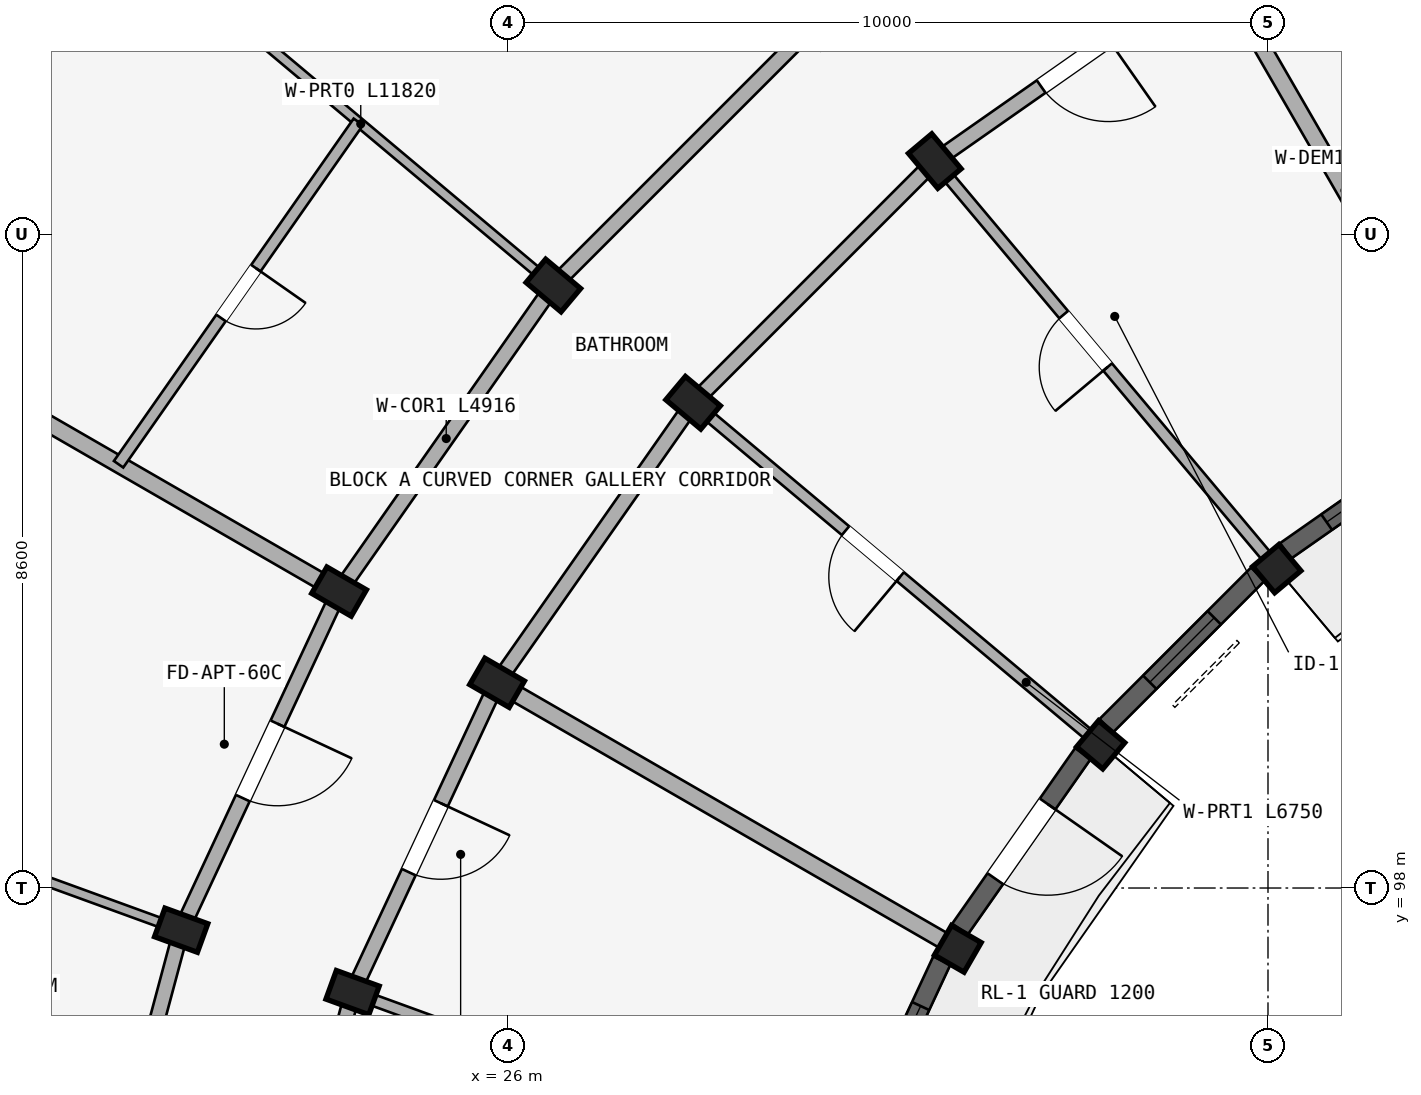
"""IFC4 building model, lengths in metres.
Left out: names, types, materials, properties, quantities, classifications, styles, units other than length and angle.
Written with IfcOpenShell. Run it as: python <this file> out.ifc"""

import sys

from ifc_helpers import new_model, si_unit, direction, frame, frame_2d, origin, origin_2d, place, context, subcontext, project, spatial, rectangle, extrude, element, fill, save


model = new_model("IFC4")
c1 = context("Model", 3, precision=1e-05, world=origin(), true_north=direction((0.0, 1.0)))
c2 = subcontext(c1, "Body", "Model", "MODEL_VIEW")
j1 = project(units=[si_unit("LENGTHUNIT", "METRE"), si_unit("PLANEANGLEUNIT", "RADIAN")], contexts=[c1])
p1 = place(None, origin())
s1 = spatial("IfcSite", under=j1, at=p1, CompositionType="ELEMENT")
p2 = place(p1, origin())
s2 = spatial("IfcBuilding", under=s1, at=p2, CompositionType="ELEMENT")
p3 = place(p2, frame((0.0, 0.0, 43.35)))
s3 = spatial("IfcBuildingStorey", under=s2, at=p3, CompositionType="ELEMENT", Elevation=43.35)
p4 = place(p3, frame((36.115, 102.202, 0.0), z_axis=(0.0, 0.0, 1.0), x_axis=(0.766044443119, 0.642787609687, 0.0)))
e1 = element("IfcColumn", 1, at=p4, inside=s3, PredefinedType="COLUMN", context=c2, shape_type="SweptSolid", body=[
    extrude(rectangle(XDim=0.45, YDim=0.45, at=origin_2d()), origin(), (0.0, 0.0, 1.0), 2.93),
])
p5 = place(p3, frame((31.616, 107.564, 0.0), z_axis=(0.0, 0.0, 1.0), x_axis=(0.766044443119, 0.642787609687, 0.0)))
e2 = element("IfcColumn", 2, at=p5, inside=s3, PredefinedType="COLUMN", context=c2, shape_type="SweptSolid", body=[
    extrude(rectangle(XDim=0.4, YDim=0.6, at=origin_2d()), origin(), (0.0, 0.0, 1.0), 2.93),
])
p6 = place(p3, frame((33.798, 99.885, 0.0), z_axis=(0.0, 0.0, 1.0), x_axis=(0.642787609687, 0.766044443119, 0.0)))
e3 = element("IfcColumn", 3, at=p6, inside=s3, PredefinedType="COLUMN", context=c2, shape_type="SweptSolid", body=[
    extrude(rectangle(XDim=0.45, YDim=0.45, at=origin_2d()), origin(), (0.0, 0.0, 1.0), 2.93),
])
for number, where, z_axis, x_axis in (
    (4, (28.436, 104.384, 0.0), (0.0, 0.0, 1.0), (0.643, 0.766, 0.0)),
    (5, (26.598, 105.927, 0.0), (0.0, 0.0, 1.0), (0.643, 0.766, 0.0)),
):
    element("IfcColumn", number, at=place(p3, frame(where, z_axis=z_axis, x_axis=x_axis)), inside=s3, PredefinedType="COLUMN", context=c2, shape_type="SweptSolid", body=[
        extrude(rectangle(XDim=0.4, YDim=0.6, at=origin_2d()), origin(), (0.0, 0.0, 1.0), 2.93),
    ])
p7 = place(p3, frame((31.919, 97.2, 0.0), z_axis=(0.0, 0.0, 1.0), x_axis=(0.5, 0.866025403784, 0.0)))
e6 = element("IfcColumn", 6, at=p7, inside=s3, PredefinedType="COLUMN", context=c2, shape_type="SweptSolid", body=[
    extrude(rectangle(XDim=0.45, YDim=0.45, at=origin_2d()), origin(), (0.0, 0.0, 1.0), 2.93),
])
for number, where, z_axis, x_axis in (
    (7, (25.856, 100.7, 0.0), (0.0, 0.0, 1.0), (0.5, 0.866, 0.0)),
    (8, (23.778, 101.9, 0.0), (0.0, 0.0, 1.0), (0.5, 0.866, 0.0)),
    (9, (23.956, 96.624, 0.0), (0.0, 0.0, 1.0), (0.342, 0.94, 0.0)),
    (10, (21.701, 97.445, 0.0), (0.0, 0.0, 1.0), (0.342, 0.94, 0.0)),
):
    element("IfcColumn", number, at=place(p3, frame(where, z_axis=z_axis, x_axis=x_axis)), inside=s3, PredefinedType="COLUMN", context=c2, shape_type="SweptSolid", body=[
        extrude(rectangle(XDim=0.4, YDim=0.6, at=origin_2d()), origin(), (0.0, 0.0, 1.0), 2.93),
    ])
p8 = place(p3, frame((35.3, 110.144, 0.0), z_axis=(0.0, 0.0, 1.0), x_axis=(-0.819155404658, -0.573571637217, 0.0)))
e11 = element("IfcWall", 11, at=p8, inside=s3, PredefinedType="STANDARD", context=c2, shape_type="SweptSolid", body=[
    extrude(rectangle(XDim=4.497, YDim=0.2, at=frame_2d((2.249, 0.0))), origin(), (0.0, 0.0, 1.0), 2.372),
])
p9 = place(p8, frame((1.709, 0.0, 0.0)))
e12 = element("IfcOpeningElement", 12, at=p9, cuts=e11, PredefinedType="OPENING", context=c2, shape_type="SweptSolid", body=[
    extrude(rectangle(XDim=1.08, YDim=2.15, at=frame_2d((0.54, 1.075))), frame((0.0, 0.11, 0.0), z_axis=(0.0, -1.0, 0.0), x_axis=(1.0, 0.0, 0.0)), (0.0, 0.0, 1.0), 0.22),
])
p10 = place(p3, frame((31.616, 107.564, 0.0), z_axis=(0.0, 0.0, 1.0), x_axis=(-0.707106781187, -0.707106781187, 0.0)))
e13 = element("IfcWall", 13, at=p10, inside=s3, PredefinedType="STANDARD", context=c2, shape_type="SweptSolid", body=[
    extrude(rectangle(XDim=4.497, YDim=0.2, at=frame_2d((2.249, 0.0))), origin(), (0.0, 0.0, 1.0), 2.372),
])
p11 = place(p3, frame((30.073, 109.402, 0.0), z_axis=(0.0, 0.0, 1.0), x_axis=(-0.707106781187, -0.707106781187, 0.0)))
e14 = element("IfcWall", 14, at=p11, inside=s3, PredefinedType="STANDARD", context=c2, shape_type="SweptSolid", body=[
    extrude(rectangle(XDim=4.916, YDim=0.2, at=frame_2d((2.458, 0.0))), origin(), (0.0, 0.0, 1.0), 2.372),
])
p12 = place(p3, frame((28.436, 104.384, 0.0), z_axis=(0.0, 0.0, 1.0), x_axis=(-0.573571637217, -0.819155404658, 0.0)))
e15 = element("IfcWall", 15, at=p12, inside=s3, PredefinedType="STANDARD", context=c2, shape_type="SweptSolid", body=[
    extrude(rectangle(XDim=4.497, YDim=0.2, at=frame_2d((2.249, 0.0))), origin(), (0.0, 0.0, 1.0), 2.372),
])
p13 = place(p3, frame((26.598, 105.927, 0.0), z_axis=(0.0, 0.0, 1.0), x_axis=(-0.573592335331, -0.819140911474, 0.0)))
e16 = element("IfcWall", 16, at=p13, inside=s3, PredefinedType="STANDARD", context=c2, shape_type="SweptSolid", body=[
    extrude(rectangle(XDim=4.916, YDim=0.2, at=frame_2d((2.458, 0.0))), origin(), (0.0, 0.0, 1.0), 2.372),
])
p14 = place(p3, frame((25.856, 100.7, 0.0), z_axis=(0.0, 0.0, 1.0), x_axis=(-0.422617978463, -0.906307919131, 0.0)))
e17 = element("IfcWall", 17, at=p14, inside=s3, PredefinedType="STANDARD", context=c2, shape_type="SweptSolid", body=[
    extrude(rectangle(XDim=4.497, YDim=0.2, at=frame_2d((2.249, 0.0))), origin(), (0.0, 0.0, 1.0), 2.372),
])
p15 = place(p14, frame((1.749, 0.0, 0.0)))
e18 = element("IfcOpeningElement", 18, at=p15, cuts=e17, PredefinedType="OPENING", context=c2, shape_type="SweptSolid", body=[
    extrude(rectangle(XDim=1.0, YDim=2.15, at=frame_2d((0.5, 1.075))), frame((0.0, 0.11, 0.0), z_axis=(0.0, -1.0, 0.0), x_axis=(1.0, 0.0, 0.0)), (0.0, 0.0, 1.0), 0.22),
])
p16 = place(p3, frame((23.778, 101.9, 0.0), z_axis=(0.0, 0.0, 1.0), x_axis=(-0.422629854778, -0.906302381024, 0.0)))
e19 = element("IfcWall", 19, at=p16, inside=s3, PredefinedType="STANDARD", context=c2, shape_type="SweptSolid", body=[
    extrude(rectangle(XDim=4.915, YDim=0.2, at=frame_2d((2.458, 0.0))), origin(), (0.0, 0.0, 1.0), 2.372),
])
p17 = place(p16, frame((1.918, 0.0, 0.0)))
e20 = element("IfcOpeningElement", 20, at=p17, cuts=e19, PredefinedType="OPENING", context=c2, shape_type="SweptSolid", body=[
    extrude(rectangle(XDim=1.08, YDim=2.15, at=frame_2d((0.54, 1.075))), frame((0.0, 0.11, 0.0), z_axis=(0.0, -1.0, 0.0), x_axis=(1.0, 0.0, 0.0)), (0.0, 0.0, 1.0), 0.22),
])
p18 = place(p3, frame((23.956, 96.624, 0.0), z_axis=(0.0, 0.0, 1.0), x_axis=(-0.258787642463, -0.965934240054, 0.0)))
e21 = element("IfcWall", 21, at=p18, inside=s3, PredefinedType="STANDARD", context=c2, shape_type="SweptSolid", body=[
    extrude(rectangle(XDim=4.497, YDim=0.2, at=frame_2d((2.249, 0.0))), origin(), (0.0, 0.0, 1.0), 2.372),
])
p19 = place(p3, frame((21.701, 97.445, 0.0), z_axis=(0.0, 0.0, 1.0), x_axis=(-0.258803112091, -0.965930095386, 0.0)))
e22 = element("IfcWall", 22, at=p19, inside=s3, PredefinedType="STANDARD", context=c2, shape_type="SweptSolid", body=[
    extrude(rectangle(XDim=4.916, YDim=0.2, at=frame_2d((2.458, 0.0))), origin(), (0.0, 0.0, 1.0), 2.372),
])
p20 = place(p3, frame((38.7, 104.254, 0.0), z_axis=(0.0, 0.0, 1.0), x_axis=(-0.499997969693, 0.866026575979, 0.0)))
e23 = element("IfcWall", 23, at=p20, inside=s3, PredefinedType="STANDARD", context=c2, shape_type="SweptSolid", body=[
    extrude(rectangle(XDim=6.75, YDim=0.22, at=frame_2d((3.375, 0.0))), origin(), (0.0, 0.0, 1.0), 2.372),
])
p21 = place(p3, frame((35.987, 102.355, 0.0), z_axis=(0.0, 0.0, 1.0), x_axis=(-0.642784846501, 0.766046761698, 0.0)))
e24 = element("IfcWall", 24, at=p21, inside=s3, PredefinedType="PARTITIONING", context=c2, shape_type="SweptSolid", body=[
    extrude(rectangle(XDim=6.75, YDim=0.15, at=frame_2d((3.375, 0.0))), origin(), (0.0, 0.0, 1.0), 2.372),
])
p22 = place(p21, frame((3.262, 0.0, 0.0)))
e25 = element("IfcOpeningElement", 25, at=p22, cuts=e24, PredefinedType="OPENING", context=c2, shape_type="SweptSolid", body=[
    extrude(rectangle(XDim=0.9, YDim=2.1, at=frame_2d((0.45, 1.05))), frame((0.0, 0.085, 0.0), z_axis=(0.0, -1.0, 0.0), x_axis=(1.0, 0.0, 0.0)), (0.0, 0.0, 1.0), 0.17),
])
p23 = place(p3, frame((33.645, 100.013, 0.0), z_axis=(0.0, 0.0, 1.0), x_axis=(-0.766046761698, 0.642784846501, 0.0)))
e26 = element("IfcWall", 26, at=p23, inside=s3, PredefinedType="PARTITIONING", context=c2, shape_type="SweptSolid", body=[
    extrude(rectangle(XDim=6.75, YDim=0.15, at=frame_2d((3.375, 0.0))), origin(), (0.0, 0.0, 1.0), 2.372),
])
p24 = place(p23, frame((3.242, 0.0, 0.0)))
e27 = element("IfcOpeningElement", 27, at=p24, cuts=e26, PredefinedType="OPENING", context=c2, shape_type="SweptSolid", body=[
    extrude(rectangle(XDim=0.94, YDim=2.1, at=frame_2d((0.47, 1.05))), frame((0.0, 0.085, 0.0), z_axis=(0.0, -1.0, 0.0), x_axis=(1.0, 0.0, 0.0)), (0.0, 0.0, 1.0), 0.17),
])
p25 = place(p3, frame((26.521, 105.991, 0.0), z_axis=(0.0, 0.0, 1.0), x_axis=(-0.766049804211, 0.642781220531, 0.0)))
e28 = element("IfcWall", 28, at=p25, inside=s3, PredefinedType="PARTITIONING", context=c2, shape_type="SweptSolid", body=[
    extrude(rectangle(XDim=11.82, YDim=0.125, at=frame_2d((5.91, 0.0))), origin(), (0.0, 0.0, 1.0), 2.372),
])
p26 = place(p25, frame((7.5, 0.0, 0.0)))
e29 = element("IfcOpeningElement", 29, at=p26, cuts=e28, PredefinedType="OPENING", context=c2, shape_type="SweptSolid", body=[
    extrude(rectangle(XDim=0.8, YDim=2.1, at=frame_2d((0.4, 1.05))), frame((0.0, 0.073, 0.0), z_axis=(0.0, -1.0, 0.0), x_axis=(1.0, 0.0, 0.0)), (0.0, 0.0, 1.0), 0.145),
])
p27 = place(p3, frame((31.746, 97.3, 0.0), z_axis=(0.0, 0.0, 1.0), x_axis=(-0.866026575979, 0.499997969693, 0.0)))
e30 = element("IfcWall", 30, at=p27, inside=s3, PredefinedType="STANDARD", context=c2, shape_type="SweptSolid", body=[
    extrude(rectangle(XDim=6.75, YDim=0.22, at=frame_2d((3.375, 0.0))), origin(), (0.0, 0.0, 1.0), 2.372),
])
p28 = place(p3, frame((23.691, 101.95, 0.0), z_axis=(0.0, 0.0, 1.0), x_axis=(-0.866017730655, 0.500013290014, 0.0)))
e31 = element("IfcWall", 31, at=p28, inside=s3, PredefinedType="STANDARD", context=c2, shape_type="SweptSolid", body=[
    extrude(rectangle(XDim=11.82, YDim=0.22, at=frame_2d((5.91, 0.0))), origin(), (0.0, 0.0, 1.0), 2.372),
])
p29 = place(p3, frame((30.346, 94.298, 0.0), z_axis=(0.0, 0.0, 1.0), x_axis=(-0.939696231917, 0.342010221662, 0.0)))
e32 = element("IfcWall", 32, at=p29, inside=s3, PredefinedType="PARTITIONING", context=c2, shape_type="SweptSolid", body=[
    extrude(rectangle(XDim=6.75, YDim=0.15, at=frame_2d((3.375, 0.0))), origin(), (0.0, 0.0, 1.0), 2.372),
])
p30 = place(p29, frame((3.262, 0.0, 0.0)))
e33 = element("IfcOpeningElement", 33, at=p30, cuts=e32, PredefinedType="OPENING", context=c2, shape_type="SweptSolid", body=[
    extrude(rectangle(XDim=0.9, YDim=2.1, at=frame_2d((0.45, 1.05))), frame((0.0, 0.085, 0.0), z_axis=(0.0, -1.0, 0.0), x_axis=(1.0, 0.0, 0.0)), (0.0, 0.0, 1.0), 0.17),
])
p31 = place(p3, frame((21.607, 97.479, 0.0), z_axis=(0.0, 0.0, 1.0), x_axis=(-0.939698102693, 0.342005081534, 0.0)))
e34 = element("IfcWall", 34, at=p31, inside=s3, PredefinedType="PARTITIONING", context=c2, shape_type="SweptSolid", body=[
    extrude(rectangle(XDim=11.82, YDim=0.125, at=frame_2d((5.91, 0.0))), origin(), (0.0, 0.0, 1.0), 2.372),
])
p32 = place(p31, frame((7.5, 0.0, 0.0)))
e35 = element("IfcOpeningElement", 35, at=p32, cuts=e34, PredefinedType="OPENING", context=c2, shape_type="SweptSolid", body=[
    extrude(rectangle(XDim=0.8, YDim=2.1, at=frame_2d((0.4, 1.05))), frame((0.0, 0.073, 0.0), z_axis=(0.0, -1.0, 0.0), x_axis=(1.0, 0.0, 0.0)), (0.0, 0.0, 1.0), 0.145),
])
p33 = place(p3, frame((24.031, 108.08, 0.0), z_axis=(0.0, 0.0, 1.0), x_axis=(-0.573569599955, -0.819156831143, 0.0)))
e36 = element("IfcWall", 36, at=p33, inside=s3, PredefinedType="PLUMBINGWALL", context=c2, shape_type="SweptSolid", body=[
    extrude(rectangle(XDim=5.5, YDim=0.15, at=frame_2d((2.75, 0.0))), origin(), (0.0, 0.0, 1.0), 2.372),
])
p34 = place(p33, frame((2.35, 0.0, 0.0)))
e37 = element("IfcOpeningElement", 37, at=p34, cuts=e36, PredefinedType="OPENING", context=c2, shape_type="SweptSolid", body=[
    extrude(rectangle(XDim=0.8, YDim=2.1, at=frame_2d((0.4, 1.05))), frame((0.0, 0.085, 0.0), z_axis=(0.0, -1.0, 0.0), x_axis=(1.0, 0.0, 0.0)), (0.0, 0.0, 1.0), 0.17),
])
p35 = place(p3, frame((38.541, 104.053, 0.0), z_axis=(0.0, 0.0, 1.0), x_axis=(-0.819154644592, -0.573572722716, 0.0)))
e38 = element("IfcWall", 38, at=p35, inside=s3, PredefinedType="STANDARD", context=c2, shape_type="SweptSolid", body=[
    extrude(rectangle(XDim=2.82, YDim=0.25, at=frame_2d((1.41, 0.0))), origin(), (0.0, 0.0, 1.0), 2.422),
])
p36 = place(p35, frame((0.66, 0.0, 0.572)))
e39 = element("IfcOpeningElement", 39, at=p36, cuts=e38, PredefinedType="OPENING", context=c2, shape_type="SweptSolid", body=[
    extrude(rectangle(XDim=1.5, YDim=1.65, at=frame_2d((0.75, 0.825))), frame((0.0, 0.135, 0.0), z_axis=(0.0, -1.0, 0.0), x_axis=(1.0, 0.0, 0.0)), (0.0, 0.0, 1.0), 0.27),
])
p37 = place(p3, frame((35.866, 102.128, 0.0), z_axis=(0.0, 0.0, 1.0), x_axis=(-0.707106781187, -0.707106781187, 0.0)))
e40 = element("IfcWall", 40, at=p37, inside=s3, PredefinedType="STANDARD", context=c2, shape_type="SweptSolid", body=[
    extrude(rectangle(XDim=2.82, YDim=0.25, at=frame_2d((1.41, 0.0))), origin(), (0.0, 0.0, 1.0), 2.422),
])
p38 = place(p37, frame((0.81, 0.0, 0.722)))
e41 = element("IfcOpeningElement", 41, at=p38, cuts=e40, PredefinedType="OPENING", context=c2, shape_type="SweptSolid", body=[
    extrude(rectangle(XDim=1.2, YDim=1.5, at=frame_2d((0.6, 0.75))), frame((0.0, 0.135, 0.0), z_axis=(0.0, -1.0, 0.0), x_axis=(1.0, 0.0, 0.0)), (0.0, 0.0, 1.0), 0.27),
])
p39 = place(p3, frame((33.565, 99.769, 0.0), z_axis=(0.0, 0.0, 1.0), x_axis=(-0.573572722716, -0.819154644592, 0.0)))
e42 = element("IfcWall", 42, at=p39, inside=s3, PredefinedType="STANDARD", context=c2, shape_type="SweptSolid", body=[
    extrude(rectangle(XDim=2.82, YDim=0.25, at=frame_2d((1.41, 0.0))), origin(), (0.0, 0.0, 1.0), 2.422),
])
p40 = place(p39, frame((0.81, 0.0, 0.0)))
e43 = element("IfcOpeningElement", 43, at=p40, cuts=e42, PredefinedType="OPENING", context=c2, shape_type="SweptSolid", body=[
    extrude(rectangle(XDim=1.2, YDim=2.15, at=frame_2d((0.6, 1.075))), frame((0.0, 0.135, 0.0), z_axis=(0.0, -1.0, 0.0), x_axis=(1.0, 0.0, 0.0)), (0.0, 0.0, 1.0), 0.27),
])
p41 = place(p3, frame((31.709, 97.046, 0.0), z_axis=(0.0, 0.0, 1.0), x_axis=(-0.422667431484, -0.906284857185, 0.0)))
e44 = element("IfcWall", 44, at=p41, inside=s3, PredefinedType="STANDARD", context=c2, shape_type="SweptSolid", body=[
    extrude(rectangle(XDim=2.82, YDim=0.25, at=frame_2d((1.41, 0.0))), origin(), (0.0, 0.0, 1.0), 2.422),
])
p42 = place(p41, frame((0.66, 0.0, 0.572)))
e45 = element("IfcOpeningElement", 45, at=p42, cuts=e44, PredefinedType="OPENING", context=c2, shape_type="SweptSolid", body=[
    extrude(rectangle(XDim=1.5, YDim=1.65, at=frame_2d((0.75, 0.825))), frame((0.0, 0.135, 0.0), z_axis=(0.0, -1.0, 0.0), x_axis=(1.0, 0.0, 0.0)), (0.0, 0.0, 1.0), 0.27),
])
p43 = place(p36, origin())
e46 = element("IfcWindow", 46, at=p43, inside=s3, PartitioningType="DOUBLE_PANEL_VERTICAL", PredefinedType="WINDOW", context=c2, shape_type="SweptSolid", body=[
    extrude(rectangle(XDim=1.5, YDim=1.65, at=frame_2d((0.75, 0.825))), frame((0.0, 0.03, 0.0), z_axis=(0.0, -1.0, 0.0), x_axis=(1.0, 0.0, 0.0)), (0.0, 0.0, 1.0), 0.06),
])
fill(e39, e46)
p44 = place(p38, origin())
e47 = element("IfcWindow", 47, at=p44, inside=s3, PartitioningType="SINGLE_PANEL", PredefinedType="WINDOW", context=c2, shape_type="SweptSolid", body=[
    extrude(rectangle(XDim=1.2, YDim=1.5, at=frame_2d((0.6, 0.75))), frame((0.0, 0.03, 0.0), z_axis=(0.0, -1.0, 0.0), x_axis=(1.0, 0.0, 0.0)), (0.0, 0.0, 1.0), 0.06),
])
fill(e41, e47)
p45 = place(p42, origin())
e48 = element("IfcWindow", 48, at=p45, inside=s3, PartitioningType="DOUBLE_PANEL_VERTICAL", PredefinedType="WINDOW", context=c2, shape_type="SweptSolid", body=[
    extrude(rectangle(XDim=1.5, YDim=1.65, at=frame_2d((0.75, 0.825))), frame((0.0, 0.03, 0.0), z_axis=(0.0, -1.0, 0.0), x_axis=(1.0, 0.0, 0.0)), (0.0, 0.0, 1.0), 0.06),
])
fill(e45, e48)
p46 = place(p22, origin())
e49 = element("IfcDoor", 49, at=p46, inside=s3, OperationType="SINGLE_SWING_LEFT", PredefinedType="DOOR", context=c2, shape_type="SweptSolid", body=[
    extrude(rectangle(XDim=0.9, YDim=2.1, at=frame_2d((0.45, 1.05))), frame((0.0, 0.025, 0.0), z_axis=(0.0, -1.0, 0.0), x_axis=(1.0, 0.0, 0.0)), (0.0, 0.0, 1.0), 0.05),
])
fill(e25, e49)
p47 = place(p24, origin())
e50 = element("IfcDoor", 50, at=p47, inside=s3, OperationType="SINGLE_SWING_LEFT", PredefinedType="DOOR", context=c2, shape_type="SweptSolid", body=[
    extrude(rectangle(XDim=0.94, YDim=2.1, at=frame_2d((0.47, 1.05))), frame((0.0, 0.025, 0.0), z_axis=(0.0, -1.0, 0.0), x_axis=(1.0, 0.0, 0.0)), (0.0, 0.0, 1.0), 0.05),
])
fill(e27, e50)
p48 = place(p34, frame((0.8, 0.0, 0.0), z_axis=(0.0, 0.0, 1.0), x_axis=(-1.0, 0.0, 0.0)))
e51 = element("IfcDoor", 51, at=p48, inside=s3, OperationType="SINGLE_SWING_RIGHT", PredefinedType="DOOR", context=c2, shape_type="SweptSolid", body=[
    extrude(rectangle(XDim=0.8, YDim=2.1, at=frame_2d((0.4, 1.05))), frame((0.0, 0.025, 0.0), z_axis=(0.0, -1.0, 0.0), x_axis=(1.0, 0.0, 0.0)), (0.0, 0.0, 1.0), 0.05),
])
fill(e37, e51)
p49 = place(p17, origin())
e52 = element("IfcDoor", 52, at=p49, inside=s3, OperationType="SINGLE_SWING_LEFT", PredefinedType="DOOR", context=c2, shape_type="SweptSolid", body=[
    extrude(rectangle(XDim=1.08, YDim=2.15, at=frame_2d((0.54, 1.075))), frame((0.0, 0.025, 0.0), z_axis=(0.0, -1.0, 0.0), x_axis=(1.0, 0.0, 0.0)), (0.0, 0.0, 1.0), 0.05),
])
fill(e20, e52)
p50 = place(p9, origin())
e53 = element("IfcDoor", 53, at=p50, inside=s3, OperationType="SINGLE_SWING_LEFT", PredefinedType="DOOR", context=c2, shape_type="SweptSolid", body=[
    extrude(rectangle(XDim=1.08, YDim=2.15, at=frame_2d((0.54, 1.075))), frame((0.0, 0.025, 0.0), z_axis=(0.0, -1.0, 0.0), x_axis=(1.0, 0.0, 0.0)), (0.0, 0.0, 1.0), 0.05),
])
fill(e12, e53)
p51 = place(p15, frame((1.0, 0.0, 0.0), z_axis=(0.0, 0.0, 1.0), x_axis=(-1.0, 0.0, 0.0)))
e54 = element("IfcDoor", 54, at=p51, inside=s3, OperationType="SINGLE_SWING_RIGHT", PredefinedType="DOOR", context=c2, shape_type="SweptSolid", body=[
    extrude(rectangle(XDim=1.0, YDim=2.15, at=frame_2d((0.5, 1.075))), frame((0.0, 0.025, 0.0), z_axis=(0.0, -1.0, 0.0), x_axis=(1.0, 0.0, 0.0)), (0.0, 0.0, 1.0), 0.05),
])
fill(e18, e54)
p52 = place(p40, origin())
e55 = element("IfcDoor", 55, at=p52, inside=s3, OperationType="SINGLE_SWING_LEFT", PredefinedType="DOOR", context=c2, shape_type="SweptSolid", body=[
    extrude(rectangle(XDim=1.2, YDim=2.15, at=frame_2d((0.6, 1.075))), frame((0.0, 0.025, 0.0), z_axis=(0.0, -1.0, 0.0), x_axis=(1.0, 0.0, 0.0)), (0.0, 0.0, 1.0), 0.05),
])
fill(e43, e55)
save(model, sys.argv[1])
